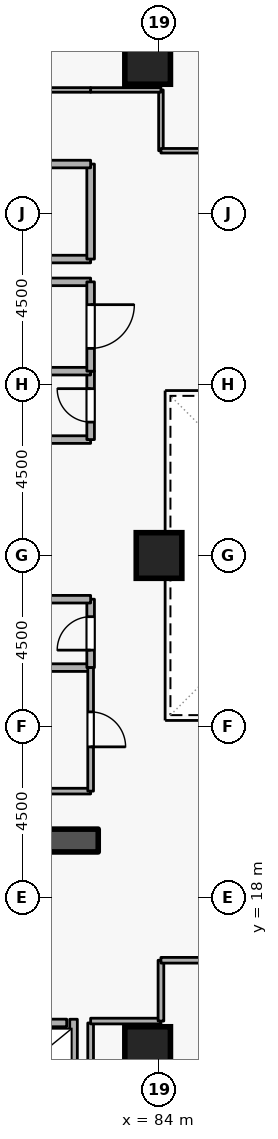
"""IFC4 building model, lengths in metres.
Left out: names, types, materials, properties, quantities, classifications, styles, units other than length and angle.
Written with IfcOpenShell. Run it as: python <this file> out.ifc"""

import sys

from ifc_helpers import new_model, si_unit, direction, frame, frame_2d, origin, origin_2d, place, context, subcontext, project, spatial, rectangle, extrude, element, fill, save


model = new_model("IFC4")
c1 = context("Model", 3, precision=1e-05, world=origin(), true_north=direction((0.0, 1.0)))
c2 = subcontext(c1, "Body", "Model", "MODEL_VIEW")
j1 = project(units=[si_unit("LENGTHUNIT", "METRE"), si_unit("PLANEANGLEUNIT", "RADIAN")], contexts=[c1])
p1 = place(None, origin())
s1 = spatial("IfcSite", under=j1, at=p1, CompositionType="ELEMENT")
p2 = place(p1, origin())
s2 = spatial("IfcBuilding", under=s1, at=p2, CompositionType="ELEMENT")
p3 = place(p2, frame((0.0, 0.0, 80.1)))
s3 = spatial("IfcBuildingStorey", under=s2, at=p3, CompositionType="ELEMENT", Elevation=80.1)
p4 = place(p3, frame((76.7, 19.5, 0.0), z_axis=(0.0, 0.0, 1.0), x_axis=(1.0, 0.0, 0.0)))
e1 = element("IfcWall", 1, at=p4, inside=s3, PredefinedType="SHEAR", context=c2, shape_type="SweptSolid", body=[
    extrude(rectangle(XDim=5.7, YDim=0.6, at=frame_2d((2.85, 0.0))), origin(), (0.0, 0.0, 1.0), 3.6),
])
for number, where, z_axis, x_axis in (
    (2, (83.7, 14.0, 0.0), (0.0, 0.0, 1.0), (1.0, 0.0, 0.0)),
    (3, (83.7, 40.0, 0.0), (0.0, 0.0, 1.0), (1.0, 0.0, 0.0)),
    (4, (84.0, 27.0, 0.0), (0.0, 0.0, 1.0), (1.0, 0.0, 0.0)),
):
    element("IfcColumn", number, at=place(p3, frame(where, z_axis=z_axis, x_axis=x_axis)), inside=s3, PredefinedType="COLUMN", context=c2, shape_type="SweptSolid", body=[
        extrude(rectangle(XDim=1.2, YDim=1.2, at=origin_2d()), origin(), (0.0, 0.0, 1.0), 3.6),
    ])
p5 = place(p3, frame((79.63, 14.7, 0.0), z_axis=(0.0, 0.0, 1.0), x_axis=(1.0, 0.0, 0.0)))
e5 = element("IfcWall", 5, at=p5, inside=s3, PredefinedType="STANDARD", context=c2, shape_type="SweptSolid", body=[
    extrude(rectangle(XDim=1.94, YDim=0.2, at=frame_2d((0.97, 0.0))), origin(), (0.0, 0.0, 1.0), 3.34),
])
p6 = place(p5, frame((0.46, 0.0, 0.0)))
e6 = element("IfcOpeningElement", 6, at=p6, cuts=e5, PredefinedType="OPENING", context=c2, shape_type="SweptSolid", body=[
    extrude(rectangle(XDim=1.02, YDim=2.06, at=frame_2d((0.51, 1.03))), frame((0.0, 0.11, 0.0), z_axis=(0.0, -1.0, 0.0), x_axis=(1.0, 0.0, 0.0)), (0.0, 0.0, 1.0), 0.22),
])
p7 = place(p3, frame((81.75, 12.612, 0.0), z_axis=(0.0, 0.0, 1.0), x_axis=(0.0, 1.0, 0.0)))
e7 = element("IfcWall", 7, at=p7, inside=s3, PredefinedType="STANDARD", context=c2, shape_type="SweptSolid", body=[
    extrude(rectangle(XDim=2.186, YDim=0.2, at=frame_2d((1.093, 0.0))), origin(), (0.0, 0.0, 1.0), 3.34),
])
p8 = place(p3, frame((79.9, 34.8, 0.0), z_axis=(0.0, 0.0, 1.0), x_axis=(1.0, 0.0, 0.0)))
e8 = element("IfcWall", 8, at=p8, inside=s3, PredefinedType="STANDARD", context=c2, shape_type="SweptSolid", body=[
    extrude(rectangle(XDim=2.3, YDim=0.2, at=frame_2d((1.15, 0.0))), origin(), (0.0, 0.0, 1.0), 2.545),
])
p9 = place(p3, frame((82.2, 34.8, 0.0), z_axis=(0.0, 0.0, 1.0), x_axis=(0.0, 1.0, 0.0)))
e9 = element("IfcWall", 9, at=p9, inside=s3, PredefinedType="STANDARD", context=c2, shape_type="SweptSolid", body=[
    extrude(rectangle(XDim=2.5, YDim=0.2, at=frame_2d((1.25, 0.0))), origin(), (0.0, 0.0, 1.0), 3.34),
])
p10 = place(p3, frame((82.2, 37.3, 0.0), z_axis=(0.0, 0.0, 1.0), x_axis=(-1.0, 0.0, 0.0)))
e10 = element("IfcWall", 10, at=p10, inside=s3, PredefinedType="STANDARD", context=c2, shape_type="SweptSolid", body=[
    extrude(rectangle(XDim=5.7, YDim=0.2, at=frame_2d((2.85, 0.0))), origin(), (0.0, 0.0, 1.0), 3.34),
])
p11 = place(p10, frame((2.275, 0.0, 0.0)))
e11 = element("IfcOpeningElement", 11, at=p11, cuts=e10, PredefinedType="OPENING", context=c2, shape_type="SweptSolid", body=[
    extrude(rectangle(XDim=1.15, YDim=2.1, at=frame_2d((0.575, 1.05))), frame((0.0, 0.11, 0.0), z_axis=(0.0, -1.0, 0.0), x_axis=(1.0, 0.0, 0.0)), (0.0, 0.0, 1.0), 0.22),
])
p12 = place(p3, frame((80.15, 24.05, 0.0), z_axis=(0.0, 0.0, 1.0), x_axis=(1.0, 0.0, 0.0)))
e12 = element("IfcWall", 12, at=p12, inside=s3, PredefinedType="STANDARD", context=c2, shape_type="SweptSolid", body=[
    extrude(rectangle(XDim=2.05, YDim=0.2, at=frame_2d((1.025, 0.0))), origin(), (0.0, 0.0, 1.0), 3.34),
])
p13 = place(p3, frame((82.2, 24.05, 0.0), z_axis=(0.0, 0.0, 1.0), x_axis=(0.0, 1.0, 0.0)))
e13 = element("IfcWall", 13, at=p13, inside=s3, PredefinedType="STANDARD", context=c2, shape_type="SweptSolid", body=[
    extrude(rectangle(XDim=1.8, YDim=0.2, at=frame_2d((0.9, 0.0))), origin(), (0.0, 0.0, 1.0), 3.34),
])
p14 = place(p13, frame((0.46, 0.0, 0.0)))
e14 = element("IfcOpeningElement", 14, at=p14, cuts=e13, PredefinedType="OPENING", context=c2, shape_type="SweptSolid", body=[
    extrude(rectangle(XDim=0.88, YDim=2.04, at=frame_2d((0.44, 1.02))), frame((0.0, 0.11, 0.0), z_axis=(0.0, -1.0, 0.0), x_axis=(1.0, 0.0, 0.0)), (0.0, 0.0, 1.0), 0.22),
])
for number, where, z_axis, x_axis in (
    (15, (82.2, 25.85, 0.0), (0.0, 0.0, 1.0), (-1.0, 0.0, 0.0)),
    (16, (80.15, 30.05, 0.0), (0.0, 0.0, 1.0), (1.0, 0.0, 0.0)),
):
    element("IfcWall", number, at=place(p3, frame(where, z_axis=z_axis, x_axis=x_axis)), inside=s3, PredefinedType="STANDARD", context=c2, shape_type="SweptSolid", body=[
        extrude(rectangle(XDim=2.05, YDim=0.2, at=frame_2d((1.025, 0.0))), origin(), (0.0, 0.0, 1.0), 3.34),
    ])
p15 = place(p3, frame((82.2, 30.05, 0.0), z_axis=(0.0, 0.0, 1.0), x_axis=(0.0, 1.0, 0.0)))
e17 = element("IfcWall", 17, at=p15, inside=s3, PredefinedType="STANDARD", context=c2, shape_type="SweptSolid", body=[
    extrude(rectangle(XDim=1.8, YDim=0.2, at=frame_2d((0.9, 0.0))), origin(), (0.0, 0.0, 1.0), 3.34),
])
p16 = place(p15, frame((0.46, 0.0, 0.0)))
e18 = element("IfcOpeningElement", 18, at=p16, cuts=e17, PredefinedType="OPENING", context=c2, shape_type="SweptSolid", body=[
    extrude(rectangle(XDim=0.88, YDim=2.04, at=frame_2d((0.44, 1.02))), frame((0.0, 0.11, 0.0), z_axis=(0.0, -1.0, 0.0), x_axis=(1.0, 0.0, 0.0)), (0.0, 0.0, 1.0), 0.22),
])
p17 = place(p3, frame((82.2, 31.85, 0.0), z_axis=(0.0, 0.0, 1.0), x_axis=(-1.0, 0.0, 0.0)))
e19 = element("IfcWall", 19, at=p17, inside=s3, PredefinedType="STANDARD", context=c2, shape_type="SweptSolid", body=[
    extrude(rectangle(XDim=2.05, YDim=0.2, at=frame_2d((1.025, 0.0))), origin(), (0.0, 0.0, 1.0), 3.34),
])
p18 = place(p3, frame((80.15, 34.2, 0.0), z_axis=(0.0, 0.0, 1.0), x_axis=(1.0, 0.0, 0.0)))
e20 = element("IfcWall", 20, at=p18, inside=s3, PredefinedType="STANDARD", context=c2, shape_type="SweptSolid", body=[
    extrude(rectangle(XDim=2.05, YDim=0.2, at=frame_2d((1.025, 0.0))), origin(), (0.0, 0.0, 1.0), 2.545),
])
p19 = place(p3, frame((82.2, 34.2, 0.0), z_axis=(0.0, 0.0, 1.0), x_axis=(0.0, -1.0, 0.0)))
e21 = element("IfcWall", 21, at=p19, inside=s3, PredefinedType="STANDARD", context=c2, shape_type="SweptSolid", body=[
    extrude(rectangle(XDim=2.35, YDim=0.2, at=frame_2d((1.175, 0.0))), origin(), (0.0, 0.0, 1.0), 3.34),
])
p20 = place(p19, frame((0.6, 0.0, 0.0)))
e22 = element("IfcOpeningElement", 22, at=p20, cuts=e21, PredefinedType="OPENING", context=c2, shape_type="SweptSolid", body=[
    extrude(rectangle(XDim=1.15, YDim=2.1, at=frame_2d((0.575, 1.05))), frame((0.0, 0.11, 0.0), z_axis=(0.0, -1.0, 0.0), x_axis=(1.0, 0.0, 0.0)), (0.0, 0.0, 1.0), 0.22),
])
p21 = place(p3, frame((82.2, 20.8, 0.0), z_axis=(0.0, 0.0, 1.0), x_axis=(-1.0, 0.0, 0.0)))
e23 = element("IfcWall", 23, at=p21, inside=s3, PredefinedType="PARTITIONING", context=c2, shape_type="SweptSolid", body=[
    extrude(rectangle(XDim=2.05, YDim=0.15, at=frame_2d((1.025, 0.0))), origin(), (0.0, 0.0, 1.0), 3.34),
])
p22 = place(p3, frame((82.2, 24.05, 0.0), z_axis=(0.0, 0.0, 1.0), x_axis=(0.0, -1.0, 0.0)))
e24 = element("IfcWall", 24, at=p22, inside=s3, PredefinedType="PARTITIONING", context=c2, shape_type="SweptSolid", body=[
    extrude(rectangle(XDim=3.25, YDim=0.15, at=frame_2d((1.625, 0.0))), origin(), (0.0, 0.0, 1.0), 3.34),
])
p23 = place(p22, frame((1.165, 0.0, 0.0)))
e25 = element("IfcOpeningElement", 25, at=p23, cuts=e24, PredefinedType="OPENING", context=c2, shape_type="SweptSolid", body=[
    extrude(rectangle(XDim=0.92, YDim=2.08, at=frame_2d((0.46, 1.04))), frame((0.0, 0.085, 0.0), z_axis=(0.0, -1.0, 0.0), x_axis=(1.0, 0.0, 0.0)), (0.0, 0.0, 1.0), 0.17),
])
p24 = place(p3, frame((82.2, 12.4, 0.0), z_axis=(0.0, 0.0, 1.0), x_axis=(0.0, 1.0, 0.0)))
e26 = element("IfcWall", 26, at=p24, inside=s3, PredefinedType="PARTITIONING", context=c2, shape_type="SweptSolid", body=[
    extrude(rectangle(XDim=2.3, YDim=0.15, at=frame_2d((1.15, 0.0))), origin(), (0.0, 0.0, 1.0), 3.34),
])
p25 = place(p3, frame((82.2, 14.75, 0.0), z_axis=(0.0, 0.0, 1.0), x_axis=(1.0, 0.0, 0.0)))
e27 = element("IfcWall", 27, at=p25, inside=s3, PredefinedType="PARTITIONING", context=c2, shape_type="SweptSolid", body=[
    extrude(rectangle(XDim=1.85, YDim=0.15, at=frame_2d((0.925, 0.0))), origin(), (0.0, 0.0, 1.0), 3.34),
])
p26 = place(p3, frame((84.05, 14.75, 0.0), z_axis=(0.0, 0.0, 1.0), x_axis=(0.0, 1.0, 0.0)))
e28 = element("IfcWall", 28, at=p26, inside=s3, PredefinedType="PARTITIONING", context=c2, shape_type="SweptSolid", body=[
    extrude(rectangle(XDim=1.6, YDim=0.15, at=frame_2d((0.8, 0.0))), origin(), (0.0, 0.0, 1.0), 3.34),
])
p27 = place(p3, frame((84.05, 16.35, 0.0), z_axis=(0.0, 0.0, 1.0), x_axis=(1.0, 0.0, 0.0)))
e29 = element("IfcWall", 29, at=p27, inside=s3, PredefinedType="PARTITIONING", context=c2, shape_type="SweptSolid", body=[
    extrude(rectangle(XDim=4.45, YDim=0.15, at=frame_2d((2.225, 0.0))), origin(), (0.0, 0.0, 1.0), 3.34),
])
p28 = place(p27, frame((1.575, 0.0, 0.0)))
e30 = element("IfcOpeningElement", 30, at=p28, cuts=e29, PredefinedType="OPENING", context=c2, shape_type="SweptSolid", body=[
    extrude(rectangle(XDim=1.3, YDim=2.12, at=frame_2d((0.65, 1.06))), frame((0.0, 0.085, 0.0), z_axis=(0.0, -1.0, 0.0), x_axis=(1.0, 0.0, 0.0)), (0.0, 0.0, 1.0), 0.17),
])
p29 = place(p3, frame((84.05, 37.65, 0.0), z_axis=(0.0, 0.0, 1.0), x_axis=(0.0, 1.0, 0.0)))
e31 = element("IfcWall", 31, at=p29, inside=s3, PredefinedType="PARTITIONING", context=c2, shape_type="SweptSolid", body=[
    extrude(rectangle(XDim=1.6, YDim=0.12, at=frame_2d((0.8, 0.0))), origin(), (0.0, 0.0, 1.0), 3.34),
])
p30 = place(p3, frame((84.05, 39.25, 0.0), z_axis=(0.0, 0.0, 1.0), x_axis=(-1.0, 0.0, 0.0)))
e32 = element("IfcWall", 32, at=p30, inside=s3, PredefinedType="PARTITIONING", context=c2, shape_type="SweptSolid", body=[
    extrude(rectangle(XDim=1.85, YDim=0.12, at=frame_2d((0.925, 0.0))), origin(), (0.0, 0.0, 1.0), 3.34),
])
p31 = place(p3, frame((82.2, 39.25, 0.0), z_axis=(0.0, 0.0, 1.0), x_axis=(-1.0, 0.0, 0.0)))
e33 = element("IfcWall", 33, at=p31, inside=s3, PredefinedType="PARTITIONING", context=c2, shape_type="SweptSolid", body=[
    extrude(rectangle(XDim=9.35, YDim=0.12, at=frame_2d((4.675, 0.0))), origin(), (0.0, 0.0, 1.0), 3.34),
])
p32 = place(p31, frame((4.15, 0.0, 0.0)))
e34 = element("IfcOpeningElement", 34, at=p32, cuts=e33, PredefinedType="OPENING", context=c2, shape_type="SweptSolid", body=[
    extrude(rectangle(XDim=1.05, YDim=2.1, at=frame_2d((0.525, 1.05))), frame((0.0, 0.07, 0.0), z_axis=(0.0, -1.0, 0.0), x_axis=(1.0, 0.0, 0.0)), (0.0, 0.0, 1.0), 0.14),
])
p33 = place(p3, frame((88.5, 37.65, 0.0), z_axis=(0.0, 0.0, 1.0), x_axis=(-1.0, 0.0, 0.0)))
e35 = element("IfcWall", 35, at=p33, inside=s3, PredefinedType="PARTITIONING", context=c2, shape_type="SweptSolid", body=[
    extrude(rectangle(XDim=4.45, YDim=0.12, at=frame_2d((2.225, 0.0))), origin(), (0.0, 0.0, 1.0), 3.34),
])
p34 = place(p14, origin())
e36 = element("IfcDoor", 36, at=p34, inside=s3, OperationType="SINGLE_SWING_LEFT", PredefinedType="DOOR", context=c2, shape_type="SweptSolid", body=[
    extrude(rectangle(XDim=0.88, YDim=2.04, at=frame_2d((0.44, 1.02))), frame((0.0, 0.025, 0.0), z_axis=(0.0, -1.0, 0.0), x_axis=(1.0, 0.0, 0.0)), (0.0, 0.0, 1.0), 0.05),
])
fill(e14, e36)
p35 = place(p16, origin())
e37 = element("IfcDoor", 37, at=p35, inside=s3, OperationType="SINGLE_SWING_RIGHT", PredefinedType="DOOR", context=c2, shape_type="SweptSolid", body=[
    extrude(rectangle(XDim=0.88, YDim=2.04, at=frame_2d((0.44, 1.02))), frame((0.0, 0.025, 0.0), z_axis=(0.0, -1.0, 0.0), x_axis=(1.0, 0.0, 0.0)), (0.0, 0.0, 1.0), 0.05),
])
fill(e18, e37)
p36 = place(p23, origin())
e38 = element("IfcDoor", 38, at=p36, inside=s3, OperationType="SINGLE_SWING_RIGHT", PredefinedType="DOOR", context=c2, shape_type="SweptSolid", body=[
    extrude(rectangle(XDim=0.92, YDim=2.08, at=frame_2d((0.46, 1.04))), frame((0.0, 0.025, 0.0), z_axis=(0.0, -1.0, 0.0), x_axis=(1.0, 0.0, 0.0)), (0.0, 0.0, 1.0), 0.05),
])
fill(e25, e38)
p37 = place(p20, origin())
e39 = element("IfcDoor", 39, at=p37, inside=s3, OperationType="SINGLE_SWING_LEFT", PredefinedType="DOOR", context=c2, shape_type="SweptSolid", body=[
    extrude(rectangle(XDim=1.15, YDim=2.1, at=frame_2d((0.575, 1.05))), frame((0.0, 0.025, 0.0), z_axis=(0.0, -1.0, 0.0), x_axis=(1.0, 0.0, 0.0)), (0.0, 0.0, 1.0), 0.05),
])
fill(e22, e39)
save(model, sys.argv[1])
